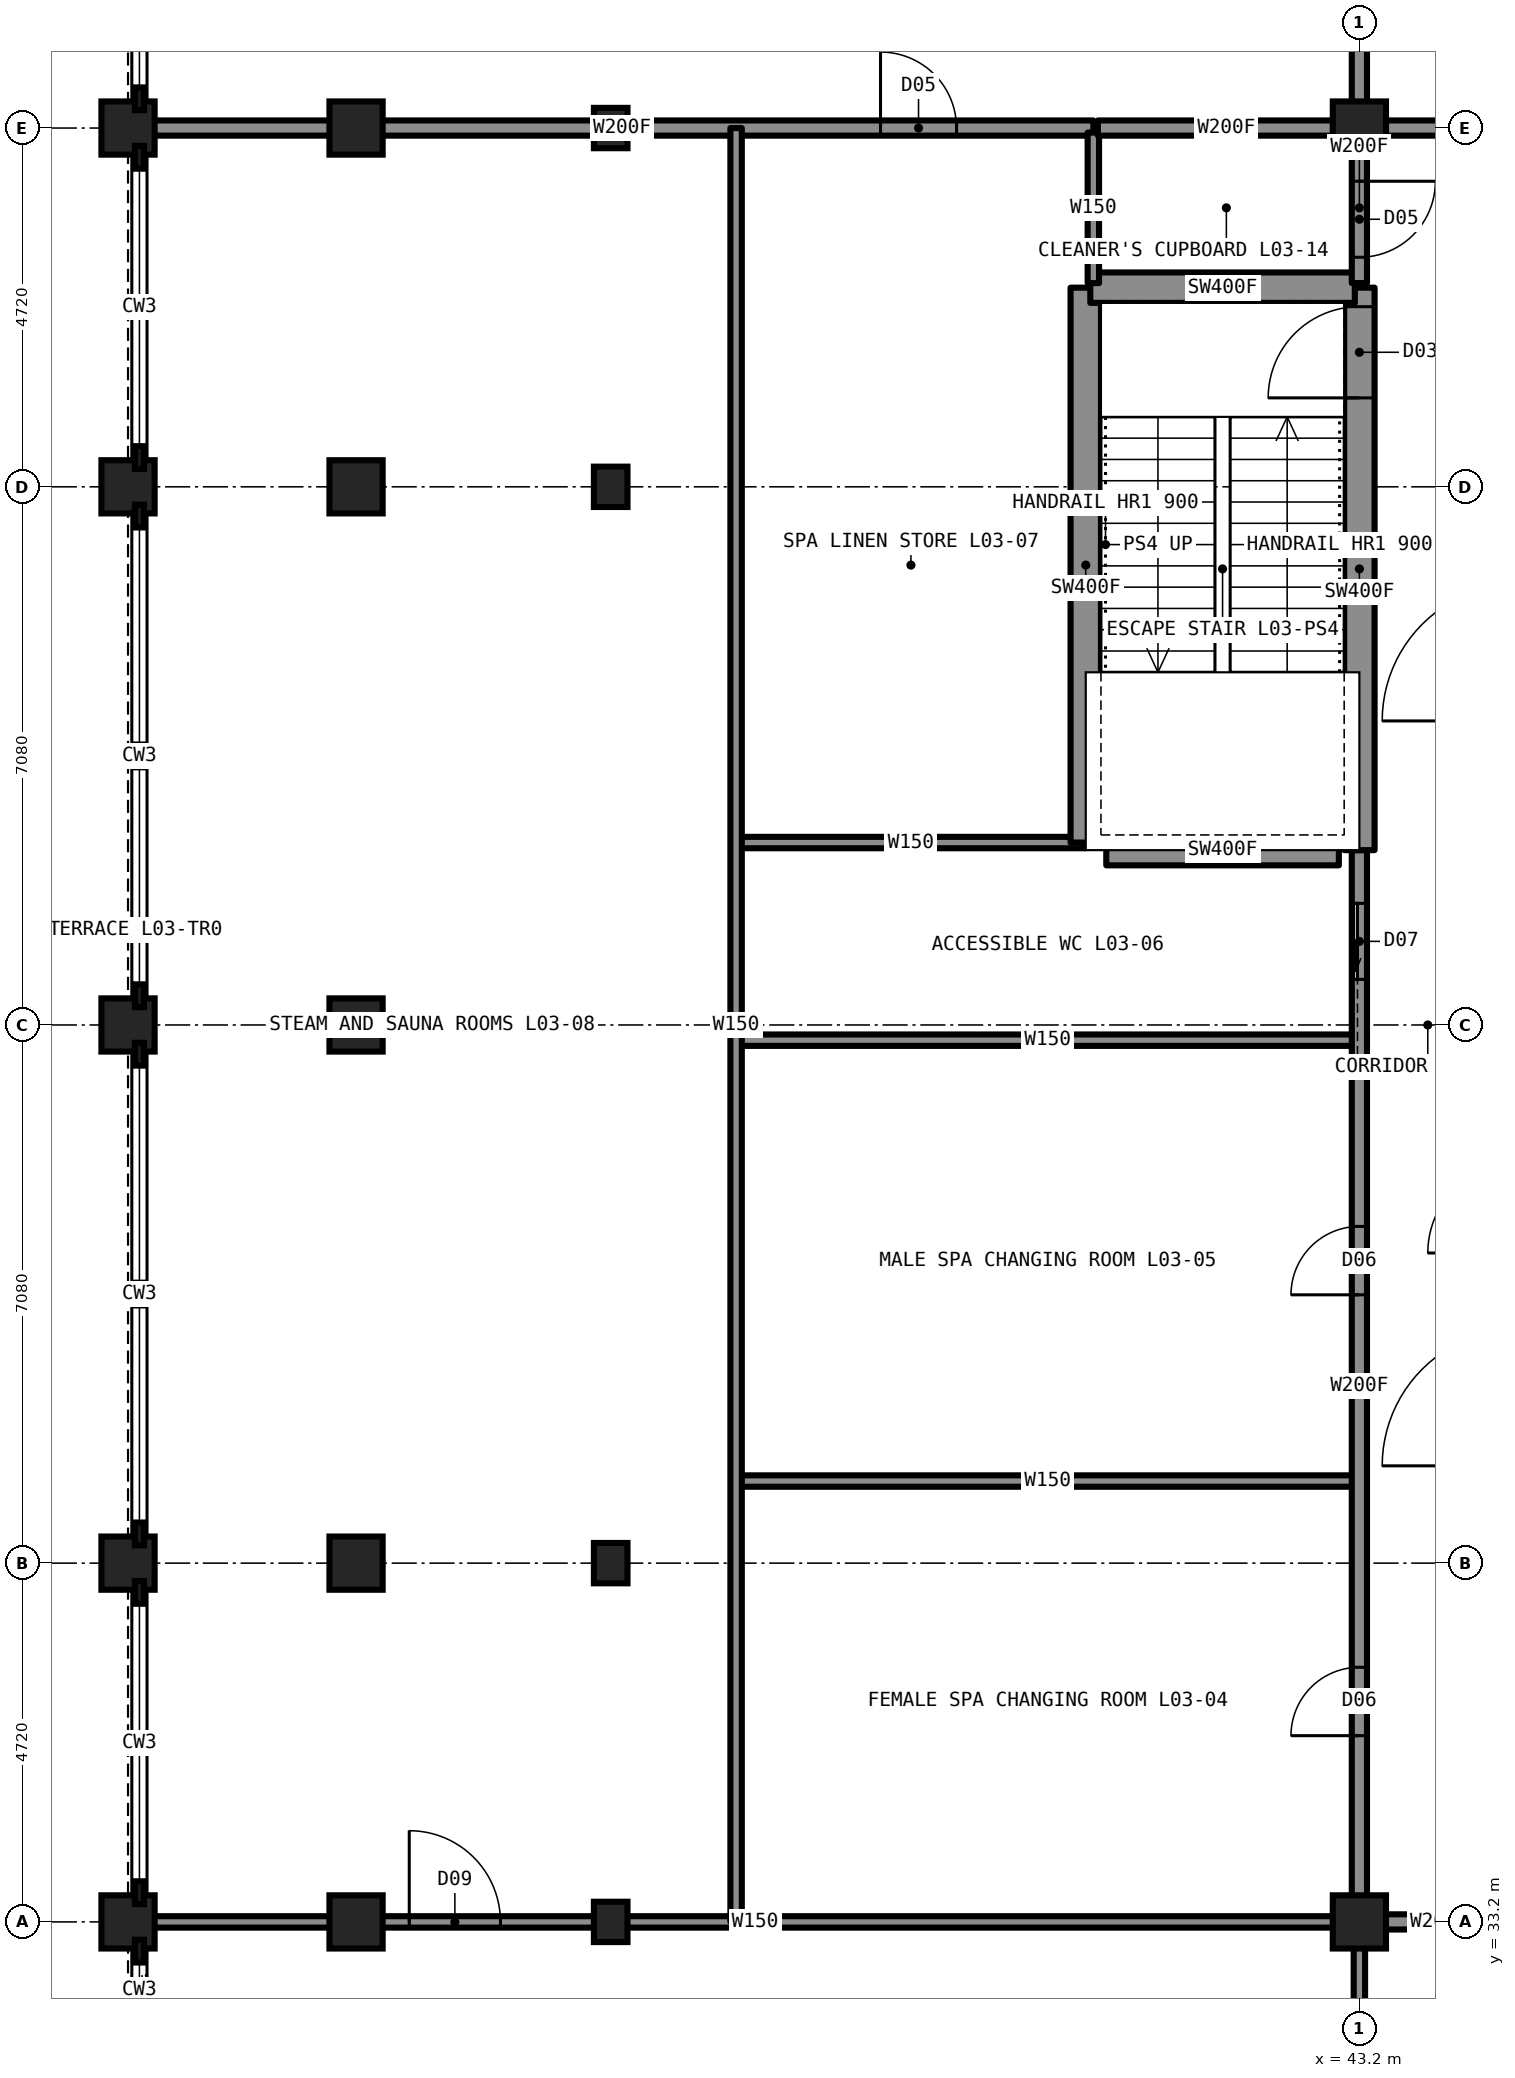
"""IFC4 building model, lengths in metres.
Left out: names, types, materials, properties, quantities, classifications, styles, units other than length and angle.
Written with IfcOpenShell. Run it as: python <this file> out.ifc"""

import sys

from ifc_helpers import new_model, si_unit, direction, frame, frame_2d, origin, origin_2d, place, context, subcontext, project, spatial, rectangle, hollow_rectangle, i_section, extrude, element, fill, save


model = new_model("IFC4")
c1 = context("Model", 3, precision=1e-05, world=origin(), true_north=direction((0.0, 1.0)))
c2 = subcontext(c1, "Body", "Model", "MODEL_VIEW")
j1 = project(units=[si_unit("LENGTHUNIT", "METRE"), si_unit("PLANEANGLEUNIT", "RADIAN")], contexts=[c1])
p1 = place(None, origin())
s1 = spatial("IfcSite", under=j1, at=p1, CompositionType="ELEMENT")
p2 = place(p1, origin())
s2 = spatial("IfcBuilding", under=s1, at=p2, CompositionType="ELEMENT")
p3 = place(p2, frame((0.0, 0.0, 16.0)))
s3 = spatial("IfcBuildingStorey", under=s2, at=p3, CompositionType="ELEMENT", Elevation=16.0)
for number, where, z_axis, x_axis in (
    (1, (33.35, 33.2, 0.0), (0.0, 0.0, 1.0), (1.0, 0.0, 0.0)),
    (2, (33.35, 37.92, 0.0), (0.0, 0.0, 1.0), (1.0, 0.0, 0.0)),
    (3, (33.35, 52.08, 0.0), (0.0, 0.0, 1.0), (1.0, 0.0, 0.0)),
    (4, (33.35, 56.8, 0.0), (0.0, 0.0, 1.0), (1.0, 0.0, 0.0)),
):
    element("IfcColumn", number, at=place(p3, frame(where, z_axis=z_axis, x_axis=x_axis)), inside=s3, PredefinedType="COLUMN", context=c2, shape_type="SweptSolid", body=[
        extrude(i_section(OverallWidth=0.442, OverallDepth=0.531, WebThickness=0.066, FlangeThickness=0.106, at=origin_2d()), origin(), (0.0, 0.0, 1.0), 4.5),
    ])
for number, where, z_axis, x_axis in (
    (5, (43.2, 33.2, 0.0), (0.0, 0.0, 1.0), (1.0, 0.0, 0.0)),
    (6, (43.2, 56.8, 0.0), (0.0, 0.0, 1.0), (1.0, 0.0, 0.0)),
):
    element("IfcColumn", number, at=place(p3, frame(where, z_axis=z_axis, x_axis=x_axis)), inside=s3, PredefinedType="COLUMN", context=c2, shape_type="SweptSolid", body=[
        extrude(hollow_rectangle(XDim=0.7, YDim=0.7, WallThickness=0.06, at=origin_2d()), origin(), (0.0, 0.0, 1.0), 4.5),
    ])
for number, where, z_axis, x_axis in (
    (7, (27.0, 33.2, 0.0), (0.0, 0.0, 1.0), (1.0, 0.0, 0.0)),
    (8, (27.0, 37.92, 0.0), (0.0, 0.0, 1.0), (1.0, 0.0, 0.0)),
    (9, (27.0, 45.0, 0.0), (0.0, 0.0, 1.0), (1.0, 0.0, 0.0)),
    (10, (27.0, 52.08, 0.0), (0.0, 0.0, 1.0), (1.0, 0.0, 0.0)),
    (11, (27.0, 56.8, 0.0), (0.0, 0.0, 1.0), (1.0, 0.0, 0.0)),
    (12, (30.0, 33.2, 0.0), (0.0, 0.0, 1.0), (1.0, 0.0, 0.0)),
    (13, (30.0, 37.92, 0.0), (0.0, 0.0, 1.0), (1.0, 0.0, 0.0)),
    (14, (30.0, 45.0, 0.0), (0.0, 0.0, 1.0), (1.0, 0.0, 0.0)),
    (15, (30.0, 52.08, 0.0), (0.0, 0.0, 1.0), (1.0, 0.0, 0.0)),
    (16, (30.0, 56.8, 0.0), (0.0, 0.0, 1.0), (1.0, 0.0, 0.0)),
):
    element("IfcColumn", number, at=place(p3, frame(where, z_axis=z_axis, x_axis=x_axis)), inside=s3, PredefinedType="COLUMN", context=c2, shape_type="SweptSolid", body=[
        extrude(rectangle(XDim=0.7, YDim=0.7, at=origin_2d()), origin(), (0.0, 0.0, 1.0), 4.5),
    ])
p4 = place(p3, frame((35.0, 44.8, 0.0), z_axis=(0.0, 0.0, 1.0), x_axis=(1.0, 0.0, 0.0)))
e17 = element("IfcWall", 17, at=p4, inside=s3, PredefinedType="PARTITIONING", context=c2, shape_type="SweptSolid", body=[
    extrude(rectangle(XDim=8.2, YDim=0.15, at=frame_2d((4.1, 0.0))), origin(), (0.0, 0.0, 1.0), 4.15),
])
p5 = place(p3, frame((43.2, 33.2, 0.0), z_axis=(0.0, 0.0, 1.0), x_axis=(1.0, 0.0, 0.0)))
e18 = element("IfcWall", 18, at=p5, inside=s3, PredefinedType="PARTITIONING", context=c2, shape_type="SweptSolid", body=[
    extrude(rectangle(XDim=2.1, YDim=0.2, at=frame_2d((1.05, 0.0))), origin(), (0.0, 0.0, 1.0), 4.15),
])
p6 = place(p3, frame((27.3, 33.2, 0.0), z_axis=(0.0, 0.0, 1.0), x_axis=(1.0, 0.0, 0.0)))
e19 = element("IfcWall", 19, at=p6, inside=s3, PredefinedType="PARTITIONING", context=c2, shape_type="SweptSolid", body=[
    extrude(rectangle(XDim=15.9, YDim=0.15, at=frame_2d((7.95, 0.0))), origin(), (0.0, 0.0, 1.0), 4.15),
])
p7 = place(p6, frame((3.4, 0.0, 0.0)))
e20 = element("IfcOpeningElement", 20, at=p7, cuts=e19, PredefinedType="OPENING", context=c2, shape_type="SweptSolid", body=[
    extrude(rectangle(XDim=1.2, YDim=2.2, at=frame_2d((0.6, 1.1))), frame((0.0, 0.085, 0.0), z_axis=(0.0, -1.0, 0.0), x_axis=(1.0, 0.0, 0.0)), (0.0, 0.0, 1.0), 0.17),
])
p8 = place(p3, frame((35.0, 39.0, 0.0), z_axis=(0.0, 0.0, 1.0), x_axis=(1.0, 0.0, 0.0)))
e21 = element("IfcWall", 21, at=p8, inside=s3, PredefinedType="PARTITIONING", context=c2, shape_type="SweptSolid", body=[
    extrude(rectangle(XDim=8.2, YDim=0.15, at=frame_2d((4.1, 0.0))), origin(), (0.0, 0.0, 1.0), 4.15),
])
p9 = place(p3, frame((43.2, 56.8, 0.0), z_axis=(0.0, 0.0, 1.0), x_axis=(1.0, 0.0, 0.0)))
e22 = element("IfcWall", 22, at=p9, inside=s3, PredefinedType="PARTITIONING", context=c2, shape_type="SweptSolid", body=[
    extrude(rectangle(XDim=14.1, YDim=0.2, at=frame_2d((7.05, 0.0))), origin(), (0.0, 0.0, 1.0), 4.15),
])
p10 = place(p9, frame((5.3, 0.0, 0.0)))
e23 = element("IfcOpeningElement", 23, at=p10, cuts=e22, PredefinedType="OPENING", context=c2, shape_type="SweptSolid", body=[
    extrude(rectangle(XDim=1.0, YDim=2.1, at=frame_2d((0.5, 1.05))), frame((0.0, 0.11, 0.0), z_axis=(0.0, -1.0, 0.0), x_axis=(1.0, 0.0, 0.0)), (0.0, 0.0, 1.0), 0.22),
])
p11 = place(p3, frame((27.3, 56.8, 0.0), z_axis=(0.0, 0.0, 1.0), x_axis=(1.0, 0.0, 0.0)))
e24 = element("IfcWall", 24, at=p11, inside=s3, PredefinedType="PARTITIONING", context=c2, shape_type="SweptSolid", body=[
    extrude(rectangle(XDim=12.4, YDim=0.2, at=frame_2d((6.2, 0.0))), origin(), (0.0, 0.0, 1.0), 4.15),
])
p12 = place(p11, frame((9.6, 0.0, 0.0)))
e25 = element("IfcOpeningElement", 25, at=p12, cuts=e24, PredefinedType="OPENING", context=c2, shape_type="SweptSolid", body=[
    extrude(rectangle(XDim=1.0, YDim=2.1, at=frame_2d((0.5, 1.05))), frame((0.0, 0.11, 0.0), z_axis=(0.0, -1.0, 0.0), x_axis=(1.0, 0.0, 0.0)), (0.0, 0.0, 1.0), 0.22),
])
p13 = place(p3, frame((39.87, 47.3, 0.0), z_axis=(0.0, 0.0, 1.0), x_axis=(1.0, 0.0, 0.0)))
e26 = element("IfcWall", 26, at=p13, inside=s3, PredefinedType="SHEAR", context=c2, shape_type="SweptSolid", body=[
    extrude(rectangle(XDim=3.06, YDim=0.4, at=frame_2d((1.53, 0.0))), origin(), (0.0, 0.0, 1.0), 4.5),
])
p14 = place(p3, frame((35.0, 47.4, 0.0), z_axis=(0.0, 0.0, 1.0), x_axis=(1.0, 0.0, 0.0)))
e27 = element("IfcWall", 27, at=p14, inside=s3, PredefinedType="PARTITIONING", context=c2, shape_type="SweptSolid", body=[
    extrude(rectangle(XDim=4.6, YDim=0.15, at=frame_2d((2.3, 0.0))), origin(), (0.0, 0.0, 1.0), 4.15),
])
p15 = place(p3, frame((43.2, 33.2, 0.0), z_axis=(0.0, 0.0, 1.0), x_axis=(0.0, 1.0, 0.0)))
e28 = element("IfcWall", 28, at=p15, inside=s3, PredefinedType="PARTITIONING", context=c2, shape_type="SweptSolid", body=[
    extrude(rectangle(XDim=14.1, YDim=0.2, at=frame_2d((7.05, 0.0))), origin(), (0.0, 0.0, 1.0), 4.15),
])
p16 = place(p15, frame((12.4, 0.0, 0.0)))
e29 = element("IfcOpeningElement", 29, at=p16, cuts=e28, PredefinedType="OPENING", context=c2, shape_type="SweptSolid", body=[
    extrude(rectangle(XDim=1.0, YDim=2.1, at=frame_2d((0.5, 1.05))), frame((0.0, 0.11, 0.0), z_axis=(0.0, -1.0, 0.0), x_axis=(1.0, 0.0, 0.0)), (0.0, 0.0, 1.0), 0.22),
])
p17 = place(p15, frame((2.45, 0.0, 0.0)))
e30 = element("IfcOpeningElement", 30, at=p17, cuts=e28, PredefinedType="OPENING", context=c2, shape_type="SweptSolid", body=[
    extrude(rectangle(XDim=0.9, YDim=2.1, at=frame_2d((0.45, 1.05))), frame((0.0, 0.11, 0.0), z_axis=(0.0, -1.0, 0.0), x_axis=(1.0, 0.0, 0.0)), (0.0, 0.0, 1.0), 0.22),
])
p18 = place(p15, frame((8.25, 0.0, 0.0)))
e31 = element("IfcOpeningElement", 31, at=p18, cuts=e28, PredefinedType="OPENING", context=c2, shape_type="SweptSolid", body=[
    extrude(rectangle(XDim=0.9, YDim=2.1, at=frame_2d((0.45, 1.05))), frame((0.0, 0.11, 0.0), z_axis=(0.0, -1.0, 0.0), x_axis=(1.0, 0.0, 0.0)), (0.0, 0.0, 1.0), 0.22),
])
p19 = place(p3, frame((43.2, 56.8, 0.0), z_axis=(0.0, 0.0, 1.0), x_axis=(0.0, 1.0, 0.0)))
e32 = element("IfcWall", 32, at=p19, inside=s3, PredefinedType="PARTITIONING", context=c2, shape_type="SweptSolid", body=[
    extrude(rectangle(XDim=13.9, YDim=0.2, at=frame_2d((6.95, 0.0))), origin(), (0.0, 0.0, 1.0), 4.15),
])
p20 = place(p19, frame((6.7, 0.0, 0.0)))
e33 = element("IfcOpeningElement", 33, at=p20, cuts=e32, PredefinedType="OPENING", context=c2, shape_type="SweptSolid", body=[
    extrude(rectangle(XDim=1.0, YDim=2.1, at=frame_2d((0.5, 1.05))), frame((0.0, 0.11, 0.0), z_axis=(0.0, -1.0, 0.0), x_axis=(1.0, 0.0, 0.0)), (0.0, 0.0, 1.0), 0.22),
])
p21 = place(p3, frame((43.2, 21.755, 0.0), z_axis=(0.0, 0.0, 1.0), x_axis=(0.0, 1.0, 0.0)))
e34 = element("IfcWall", 34, at=p21, inside=s3, PredefinedType="PARTITIONING", context=c2, shape_type="SweptSolid", body=[
    extrude(rectangle(XDim=11.445, YDim=0.15, at=frame_2d((5.723, 0.0))), origin(), (0.0, 0.0, 1.0), 4.15),
])
p22 = place(p21, frame((4.445, 0.0, 0.0)))
e35 = element("IfcOpeningElement", 35, at=p22, cuts=e34, PredefinedType="OPENING", context=c2, shape_type="SweptSolid", body=[
    extrude(rectangle(XDim=1.6, YDim=2.4, at=frame_2d((0.8, 1.2))), frame((0.0, 0.085, 0.0), z_axis=(0.0, -1.0, 0.0), x_axis=(1.0, 0.0, 0.0)), (0.0, 0.0, 1.0), 0.17),
])
p23 = place(p3, frame((43.2, 47.3, 0.0), z_axis=(0.0, 0.0, 1.0), x_axis=(0.0, 1.0, 0.0)))
e36 = element("IfcWall", 36, at=p23, inside=s3, PredefinedType="SHEAR", context=c2, shape_type="SweptSolid", body=[
    extrude(rectangle(XDim=7.4, YDim=0.4, at=frame_2d((3.7, 0.0))), origin(), (0.0, 0.0, 1.0), 4.5),
])
p24 = place(p23, frame((5.95, 0.0, 0.0)))
e37 = element("IfcOpeningElement", 37, at=p24, cuts=e36, PredefinedType="OPENING", context=c2, shape_type="SweptSolid", body=[
    extrude(rectangle(XDim=1.2, YDim=2.2, at=frame_2d((0.6, 1.1))), frame((0.0, 0.21, 0.0), z_axis=(0.0, -1.0, 0.0), x_axis=(1.0, 0.0, 0.0)), (0.0, 0.0, 1.0), 0.42),
])
p25 = place(p3, frame((39.6, 47.4, 0.0), z_axis=(0.0, 0.0, 1.0), x_axis=(0.0, 1.0, 0.0)))
e38 = element("IfcWall", 38, at=p25, inside=s3, PredefinedType="SHEAR", context=c2, shape_type="SweptSolid", body=[
    extrude(rectangle(XDim=7.3, YDim=0.4, at=frame_2d((3.65, 0.0))), origin(), (0.0, 0.0, 1.0), 4.5),
])
p26 = place(p3, frame((35.0, 33.2, 0.0), z_axis=(0.0, 0.0, 1.0), x_axis=(0.0, 1.0, 0.0)))
e39 = element("IfcWall", 39, at=p26, inside=s3, PredefinedType="PARTITIONING", context=c2, shape_type="SweptSolid", body=[
    extrude(rectangle(XDim=23.6, YDim=0.15, at=frame_2d((11.8, 0.0))), origin(), (0.0, 0.0, 1.0), 4.15),
])
p27 = place(p3, frame((43.14, 54.7, 0.0), z_axis=(0.0, 0.0, 1.0), x_axis=(-1.0, 0.0, 0.0)))
e40 = element("IfcWall", 40, at=p27, inside=s3, PredefinedType="SHEAR", context=c2, shape_type="SweptSolid", body=[
    extrude(rectangle(XDim=3.48, YDim=0.4, at=frame_2d((1.74, 0.0))), origin(), (0.0, 0.0, 1.0), 4.5),
])
p28 = place(p3, frame((43.2, 56.74, 0.0), z_axis=(0.0, 0.0, 1.0), x_axis=(0.0, -1.0, 0.0)))
e41 = element("IfcWall", 41, at=p28, inside=s3, PredefinedType="PARTITIONING", context=c2, shape_type="SweptSolid", body=[
    extrude(rectangle(XDim=1.98, YDim=0.2, at=frame_2d((0.99, 0.0))), origin(), (0.0, 0.0, 1.0), 4.15),
])
p29 = place(p28, frame((0.64, 0.0, 0.0)))
e42 = element("IfcOpeningElement", 42, at=p29, cuts=e41, PredefinedType="OPENING", context=c2, shape_type="SweptSolid", body=[
    extrude(rectangle(XDim=1.0, YDim=2.1, at=frame_2d((0.5, 1.05))), frame((0.0, 0.11, 0.0), z_axis=(0.0, -1.0, 0.0), x_axis=(1.0, 0.0, 0.0)), (0.0, 0.0, 1.0), 0.22),
])
p30 = place(p3, frame((39.7, 54.76, 0.0), z_axis=(0.0, 0.0, 1.0), x_axis=(0.0, 1.0, 0.0)))
e43 = element("IfcWall", 43, at=p30, inside=s3, PredefinedType="PARTITIONING", context=c2, shape_type="SweptSolid", body=[
    extrude(rectangle(XDim=1.98, YDim=0.15, at=frame_2d((0.99, 0.0))), origin(), (0.0, 0.0, 1.0), 4.15),
])
p31 = place(p3, frame((39.76, 56.8, 0.0), z_axis=(0.0, 0.0, 1.0), x_axis=(1.0, 0.0, 0.0)))
e44 = element("IfcWall", 44, at=p31, inside=s3, PredefinedType="PARTITIONING", context=c2, shape_type="SweptSolid", body=[
    extrude(rectangle(XDim=3.38, YDim=0.2, at=frame_2d((1.69, 0.0))), origin(), (0.0, 0.0, 1.0), 4.15),
])
p32 = place(p24, origin())
e45 = element("IfcDoor", 45, at=p32, inside=s3, OperationType="SINGLE_SWING_LEFT", PredefinedType="DOOR", context=c2, shape_type="SweptSolid", body=[
    extrude(rectangle(XDim=1.2, YDim=2.2, at=frame_2d((0.6, 1.1))), frame((0.0, 0.025, 0.0), z_axis=(0.0, -1.0, 0.0), x_axis=(1.0, 0.0, 0.0)), (0.0, 0.0, 1.0), 0.05),
])
fill(e37, e45)
p33 = place(p12, origin())
e46 = element("IfcDoor", 46, at=p33, inside=s3, OperationType="SINGLE_SWING_LEFT", PredefinedType="DOOR", context=c2, shape_type="SweptSolid", body=[
    extrude(rectangle(XDim=1.0, YDim=2.1, at=frame_2d((0.5, 1.05))), frame((0.0, 0.025, 0.0), z_axis=(0.0, -1.0, 0.0), x_axis=(1.0, 0.0, 0.0)), (0.0, 0.0, 1.0), 0.05),
])
fill(e25, e46)
p34 = place(p7, origin())
e47 = element("IfcDoor", 47, at=p34, inside=s3, OperationType="SINGLE_SWING_LEFT", PredefinedType="DOOR", context=c2, shape_type="SweptSolid", body=[
    extrude(rectangle(XDim=1.2, YDim=2.2, at=frame_2d((0.6, 1.1))), frame((0.0, 0.025, 0.0), z_axis=(0.0, -1.0, 0.0), x_axis=(1.0, 0.0, 0.0)), (0.0, 0.0, 1.0), 0.05),
])
fill(e20, e47)
p35 = place(p29, origin())
e48 = element("IfcDoor", 48, at=p35, inside=s3, OperationType="SINGLE_SWING_LEFT", PredefinedType="DOOR", context=c2, shape_type="SweptSolid", body=[
    extrude(rectangle(XDim=1.0, YDim=2.1, at=frame_2d((0.5, 1.05))), frame((0.0, 0.025, 0.0), z_axis=(0.0, -1.0, 0.0), x_axis=(1.0, 0.0, 0.0)), (0.0, 0.0, 1.0), 0.05),
])
fill(e42, e48)
p36 = place(p16, origin())
e49 = element("IfcDoor", 49, at=p36, inside=s3, OperationType="SLIDING_TO_LEFT", PredefinedType="DOOR", context=c2, shape_type="SweptSolid", body=[
    extrude(rectangle(XDim=1.0, YDim=2.1, at=frame_2d((0.5, 1.05))), frame((0.0, 0.025, 0.0), z_axis=(0.0, -1.0, 0.0), x_axis=(1.0, 0.0, 0.0)), (0.0, 0.0, 1.0), 0.05),
])
fill(e29, e49)
p37 = place(p17, origin())
e50 = element("IfcDoor", 50, at=p37, inside=s3, OperationType="SINGLE_SWING_LEFT", PredefinedType="DOOR", context=c2, shape_type="SweptSolid", body=[
    extrude(rectangle(XDim=0.9, YDim=2.1, at=frame_2d((0.45, 1.05))), frame((0.0, 0.025, 0.0), z_axis=(0.0, -1.0, 0.0), x_axis=(1.0, 0.0, 0.0)), (0.0, 0.0, 1.0), 0.05),
])
fill(e30, e50)
p38 = place(p18, origin())
e51 = element("IfcDoor", 51, at=p38, inside=s3, OperationType="SINGLE_SWING_LEFT", PredefinedType="DOOR", context=c2, shape_type="SweptSolid", body=[
    extrude(rectangle(XDim=0.9, YDim=2.1, at=frame_2d((0.45, 1.05))), frame((0.0, 0.025, 0.0), z_axis=(0.0, -1.0, 0.0), x_axis=(1.0, 0.0, 0.0)), (0.0, 0.0, 1.0), 0.05),
])
fill(e31, e51)
save(model, sys.argv[1])
